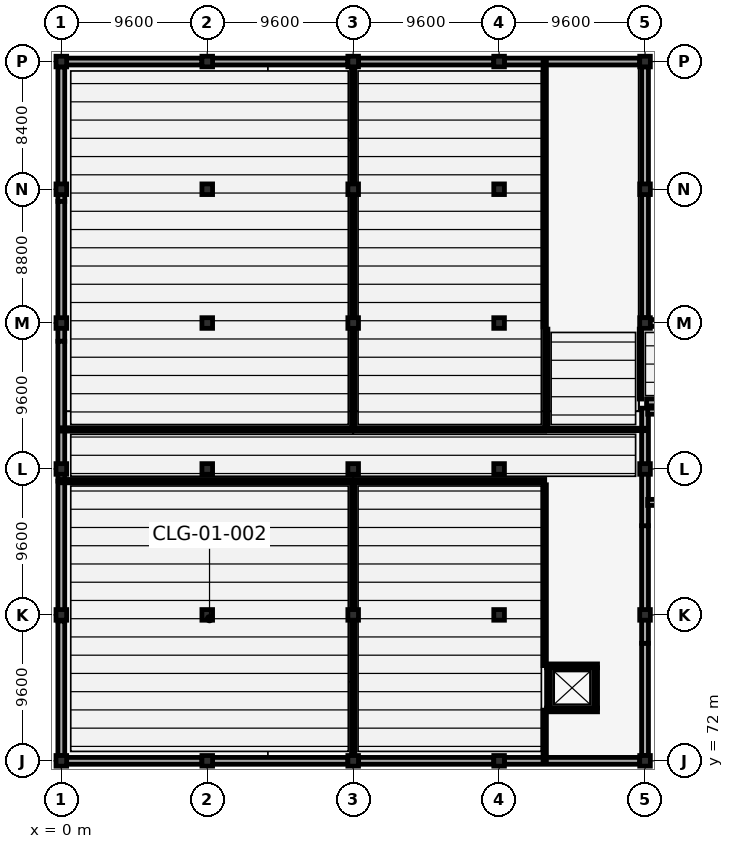
"""IFC4 building model, lengths in metres.
Left out: names, types, materials, properties, quantities, classifications, styles, units other than length and angle.
Written with IfcOpenShell. Run it as: python <this file> out.ifc"""

import sys

from ifc_helpers import new_model, si_unit, direction, frame, frame_2d, origin, origin_2d, place, context, subcontext, project, spatial, rectangle, extrude, element, fill, save


model = new_model("IFC4")
c1 = context("Model", 3, precision=1e-05, world=origin(), true_north=direction((0.0, 1.0)))
c2 = subcontext(c1, "Body", "Model", "MODEL_VIEW")
j1 = project(units=[si_unit("LENGTHUNIT", "METRE"), si_unit("PLANEANGLEUNIT", "RADIAN")], contexts=[c1])
p1 = place(None, origin())
s1 = spatial("IfcSite", under=j1, at=p1, CompositionType="ELEMENT")
p2 = place(p1, origin())
s2 = spatial("IfcBuilding", under=s1, at=p2, CompositionType="ELEMENT")
p3 = place(p2, frame((0.0, 0.0, -4.2)))
s3 = spatial("IfcBuildingStorey", under=s2, at=p3, CompositionType="ELEMENT", Elevation=-4.2)
for number, where, z_axis, x_axis in (
    (1, (0.0, 72.0, 0.0), (0.0, 0.0, 1.0), (1.0, 0.0, 0.0)),
    (2, (0.0, 81.6, 0.0), (0.0, 0.0, 1.0), (1.0, 0.0, 0.0)),
    (3, (0.0, 91.2, 0.0), (0.0, 0.0, 1.0), (1.0, 0.0, 0.0)),
    (4, (0.0, 100.8, 0.0), (0.0, 0.0, 1.0), (1.0, 0.0, 0.0)),
    (5, (0.0, 109.6, 0.0), (0.0, 0.0, 1.0), (1.0, 0.0, 0.0)),
    (6, (0.0, 118.0, 0.0), (0.0, 0.0, 1.0), (1.0, 0.0, 0.0)),
    (7, (9.6, 72.0, 0.0), (0.0, 0.0, 1.0), (1.0, 0.0, 0.0)),
    (8, (9.6, 81.6, 0.0), (0.0, 0.0, 1.0), (1.0, 0.0, 0.0)),
    (9, (9.6, 91.2, 0.0), (0.0, 0.0, 1.0), (1.0, 0.0, 0.0)),
    (10, (9.6, 100.8, 0.0), (0.0, 0.0, 1.0), (1.0, 0.0, 0.0)),
    (11, (9.6, 109.6, 0.0), (0.0, 0.0, 1.0), (1.0, 0.0, 0.0)),
    (12, (9.6, 118.0, 0.0), (0.0, 0.0, 1.0), (1.0, 0.0, 0.0)),
    (13, (19.2, 72.0, 0.0), (0.0, 0.0, 1.0), (1.0, 0.0, 0.0)),
    (14, (19.2, 81.6, 0.0), (0.0, 0.0, 1.0), (1.0, 0.0, 0.0)),
    (15, (19.2, 91.2, 0.0), (0.0, 0.0, 1.0), (1.0, 0.0, 0.0)),
    (16, (19.2, 100.8, 0.0), (0.0, 0.0, 1.0), (1.0, 0.0, 0.0)),
    (17, (19.2, 109.6, 0.0), (0.0, 0.0, 1.0), (1.0, 0.0, 0.0)),
    (18, (19.2, 118.0, 0.0), (0.0, 0.0, 1.0), (1.0, 0.0, 0.0)),
    (19, (28.8, 72.0, 0.0), (0.0, 0.0, 1.0), (1.0, 0.0, 0.0)),
    (20, (28.8, 81.6, 0.0), (0.0, 0.0, 1.0), (1.0, 0.0, 0.0)),
    (21, (28.8, 91.2, 0.0), (0.0, 0.0, 1.0), (1.0, 0.0, 0.0)),
    (22, (28.8, 100.8, 0.0), (0.0, 0.0, 1.0), (1.0, 0.0, 0.0)),
    (23, (28.8, 109.6, 0.0), (0.0, 0.0, 1.0), (1.0, 0.0, 0.0)),
    (24, (28.8, 118.0, 0.0), (0.0, 0.0, 1.0), (1.0, 0.0, 0.0)),
    (25, (38.4, 72.0, 0.0), (0.0, 0.0, 1.0), (1.0, 0.0, 0.0)),
    (26, (38.4, 81.6, 0.0), (0.0, 0.0, 1.0), (1.0, 0.0, 0.0)),
    (27, (38.4, 91.2, 0.0), (0.0, 0.0, 1.0), (1.0, 0.0, 0.0)),
    (28, (38.4, 100.8, 0.0), (0.0, 0.0, 1.0), (1.0, 0.0, 0.0)),
    (29, (38.4, 109.6, 0.0), (0.0, 0.0, 1.0), (1.0, 0.0, 0.0)),
    (30, (38.4, 118.0, 0.0), (0.0, 0.0, 1.0), (1.0, 0.0, 0.0)),
):
    element("IfcColumn", number, at=place(p3, frame(where, z_axis=z_axis, x_axis=x_axis)), inside=s3, PredefinedType="COLUMN", context=c2, shape_type="SweptSolid", body=[
        extrude(rectangle(XDim=0.7, YDim=0.7, at=origin_2d()), origin(), (0.0, 0.0, 1.0), 4.2),
    ])
p4 = place(p3, frame((0.35, 72.0, 0.0), z_axis=(0.0, 0.0, 1.0), x_axis=(1.0, 0.0, 0.0)))
e31 = element("IfcWall", 31, at=p4, inside=s3, PredefinedType="SOLIDWALL", context=c2, shape_type="SweptSolid", body=[
    extrude(rectangle(XDim=8.9, YDim=0.45, at=frame_2d((4.45, 0.0))), origin(), (0.0, 0.0, 1.0), 3.84),
])
p5 = place(p3, frame((9.95, 72.0, 0.0), z_axis=(0.0, 0.0, 1.0), x_axis=(1.0, 0.0, 0.0)))
e32 = element("IfcWall", 32, at=p5, inside=s3, PredefinedType="SOLIDWALL", context=c2, shape_type="SweptSolid", body=[
    extrude(rectangle(XDim=8.9, YDim=0.45, at=frame_2d((4.45, 0.0))), origin(), (0.0, 0.0, 1.0), 3.84),
])
p6 = place(p3, frame((19.55, 72.0, 0.0), z_axis=(0.0, 0.0, 1.0), x_axis=(1.0, 0.0, 0.0)))
e33 = element("IfcWall", 33, at=p6, inside=s3, PredefinedType="SOLIDWALL", context=c2, shape_type="SweptSolid", body=[
    extrude(rectangle(XDim=8.9, YDim=0.45, at=frame_2d((4.45, 0.0))), origin(), (0.0, 0.0, 1.0), 3.84),
])
p7 = place(p3, frame((29.15, 72.0, 0.0), z_axis=(0.0, 0.0, 1.0), x_axis=(1.0, 0.0, 0.0)))
e34 = element("IfcWall", 34, at=p7, inside=s3, PredefinedType="SOLIDWALL", context=c2, shape_type="SweptSolid", body=[
    extrude(rectangle(XDim=8.9, YDim=0.45, at=frame_2d((4.45, 0.0))), origin(), (0.0, 0.0, 1.0), 3.84),
])
p8 = place(p3, frame((38.4, 72.35, 0.0), z_axis=(0.0, 0.0, 1.0), x_axis=(0.0, 1.0, 0.0)))
e35 = element("IfcWall", 35, at=p8, inside=s3, PredefinedType="SOLIDWALL", context=c2, shape_type="SweptSolid", body=[
    extrude(rectangle(XDim=7.383, YDim=0.45, at=frame_2d((3.691, 0.0))), origin(), (0.0, 0.0, 1.0), 3.84),
])
p9 = place(p3, frame((38.4, 79.733, 0.0), z_axis=(0.0, 0.0, 1.0), x_axis=(0.0, 1.0, 0.0)))
e36 = element("IfcWall", 36, at=p9, inside=s3, PredefinedType="SOLIDWALL", context=c2, shape_type="SweptSolid", body=[
    extrude(rectangle(XDim=7.734, YDim=0.45, at=frame_2d((3.867, 0.0))), origin(), (0.0, 0.0, 1.0), 3.84),
])
p10 = place(p3, frame((38.4, 87.467, 0.0), z_axis=(0.0, 0.0, 1.0), x_axis=(0.0, 1.0, 0.0)))
e37 = element("IfcWall", 37, at=p10, inside=s3, PredefinedType="SOLIDWALL", context=c2, shape_type="SweptSolid", body=[
    extrude(rectangle(XDim=7.733, YDim=0.45, at=frame_2d((3.866, 0.0))), origin(), (0.0, 0.0, 1.0), 3.84),
])
for number, where, z_axis, x_axis in (
    (38, (38.4, 101.15, 0.0), (0.0, 0.0, 1.0), (0.0, 1.0, 0.0)),
    (39, (38.4, 109.4, 0.0), (0.0, 0.0, 1.0), (0.0, 1.0, 0.0)),
):
    element("IfcWall", number, at=place(p3, frame(where, z_axis=z_axis, x_axis=x_axis)), inside=s3, PredefinedType="SOLIDWALL", context=c2, shape_type="SweptSolid", body=[
        extrude(rectangle(XDim=8.25, YDim=0.45, at=frame_2d((4.125, 0.0))), origin(), (0.0, 0.0, 1.0), 3.84),
    ])
p11 = place(p3, frame((38.05, 118.0, 0.0), z_axis=(0.0, 0.0, 1.0), x_axis=(-1.0, 0.0, 0.0)))
e40 = element("IfcWall", 40, at=p11, inside=s3, PredefinedType="SOLIDWALL", context=c2, shape_type="SweptSolid", body=[
    extrude(rectangle(XDim=8.9, YDim=0.45, at=frame_2d((4.45, 0.0))), origin(), (0.0, 0.0, 1.0), 3.84),
])
p12 = place(p3, frame((28.45, 118.0, 0.0), z_axis=(0.0, 0.0, 1.0), x_axis=(-1.0, 0.0, 0.0)))
e41 = element("IfcWall", 41, at=p12, inside=s3, PredefinedType="SOLIDWALL", context=c2, shape_type="SweptSolid", body=[
    extrude(rectangle(XDim=8.9, YDim=0.45, at=frame_2d((4.45, 0.0))), origin(), (0.0, 0.0, 1.0), 3.84),
])
p13 = place(p3, frame((18.85, 118.0, 0.0), z_axis=(0.0, 0.0, 1.0), x_axis=(-1.0, 0.0, 0.0)))
e42 = element("IfcWall", 42, at=p13, inside=s3, PredefinedType="SOLIDWALL", context=c2, shape_type="SweptSolid", body=[
    extrude(rectangle(XDim=8.9, YDim=0.45, at=frame_2d((4.45, 0.0))), origin(), (0.0, 0.0, 1.0), 3.84),
])
p14 = place(p3, frame((9.25, 118.0, 0.0), z_axis=(0.0, 0.0, 1.0), x_axis=(-1.0, 0.0, 0.0)))
e43 = element("IfcWall", 43, at=p14, inside=s3, PredefinedType="SOLIDWALL", context=c2, shape_type="SweptSolid", body=[
    extrude(rectangle(XDim=8.9, YDim=0.45, at=frame_2d((4.45, 0.0))), origin(), (0.0, 0.0, 1.0), 3.84),
])
p15 = place(p3, frame((0.0, 117.65, 0.0), z_axis=(0.0, 0.0, 1.0), x_axis=(0.0, -1.0, 0.0)))
e44 = element("IfcWall", 44, at=p15, inside=s3, PredefinedType="SOLIDWALL", context=c2, shape_type="SweptSolid", body=[
    extrude(rectangle(XDim=8.85, YDim=0.45, at=frame_2d((4.425, 0.0))), origin(), (0.0, 0.0, 1.0), 3.84),
])
p16 = place(p3, frame((0.0, 108.8, 0.0), z_axis=(0.0, 0.0, 1.0), x_axis=(0.0, -1.0, 0.0)))
e45 = element("IfcWall", 45, at=p16, inside=s3, PredefinedType="SOLIDWALL", context=c2, shape_type="SweptSolid", body=[
    extrude(rectangle(XDim=9.2, YDim=0.45, at=frame_2d((4.6, 0.0))), origin(), (0.0, 0.0, 1.0), 3.84),
])
p17 = place(p3, frame((0.0, 99.6, 0.0), z_axis=(0.0, 0.0, 1.0), x_axis=(0.0, -1.0, 0.0)))
e46 = element("IfcWall", 46, at=p17, inside=s3, PredefinedType="SOLIDWALL", context=c2, shape_type="SweptSolid", body=[
    extrude(rectangle(XDim=9.2, YDim=0.45, at=frame_2d((4.6, 0.0))), origin(), (0.0, 0.0, 1.0), 3.84),
])
p18 = place(p3, frame((0.0, 90.4, 0.0), z_axis=(0.0, 0.0, 1.0), x_axis=(0.0, -1.0, 0.0)))
e47 = element("IfcWall", 47, at=p18, inside=s3, PredefinedType="SOLIDWALL", context=c2, shape_type="SweptSolid", body=[
    extrude(rectangle(XDim=9.2, YDim=0.45, at=frame_2d((4.6, 0.0))), origin(), (0.0, 0.0, 1.0), 3.84),
])
p19 = place(p3, frame((0.0, 81.2, 0.0), z_axis=(0.0, 0.0, 1.0), x_axis=(0.0, -1.0, 0.0)))
e48 = element("IfcWall", 48, at=p19, inside=s3, PredefinedType="SOLIDWALL", context=c2, shape_type="SweptSolid", body=[
    extrude(rectangle(XDim=8.85, YDim=0.45, at=frame_2d((4.425, 0.0))), origin(), (0.0, 0.0, 1.0), 3.84),
])
for number, where, z_axis, x_axis in (
    (49, (38.5, 95.58, 0.0), (0.0, 0.0, 1.0), (1.0, 0.0, 0.0)),
    (50, (38.5, 100.8, 0.0), (0.0, 0.0, 1.0), (1.0, 0.0, 0.0)),
):
    element("IfcWall", number, at=place(p3, frame(where, z_axis=z_axis, x_axis=x_axis)), inside=s3, PredefinedType="SOLIDWALL", context=c2, shape_type="SweptSolid", body=[
        extrude(rectangle(XDim=9.4, YDim=0.45, at=frame_2d((4.7, 0.0))), origin(), (0.0, 0.0, 1.0), 3.84),
    ])
for number, where, z_axis, x_axis in (
    (51, (38.575, 89.0, 0.0), (0.0, 0.0, 1.0), (1.0, 0.0, 0.0)),
    (52, (38.575, 95.0, 0.0), (0.0, 0.0, 1.0), (1.0, 0.0, 0.0)),
):
    element("IfcWall", number, at=place(p3, frame(where, z_axis=z_axis, x_axis=x_axis)), inside=s3, PredefinedType="SOLIDWALL", context=c2, shape_type="SweptSolid", body=[
        extrude(rectangle(XDim=9.25, YDim=0.4, at=frame_2d((4.625, 0.0))), origin(), (0.0, 0.0, 1.0), 9.0),
    ])
for number, where, z_axis, x_axis in (
    (53, (35.275, 75.35, -1.5), (0.0, 0.0, 1.0), (-1.0, 0.0, 0.0)),
    (54, (31.925, 78.25, -1.5), (0.0, 0.0, 1.0), (1.0, 0.0, 0.0)),
):
    element("IfcWall", number, at=place(p3, frame(where, z_axis=z_axis, x_axis=x_axis)), inside=s3, PredefinedType="SOLIDWALL", context=c2, shape_type="SweptSolid", body=[
        extrude(rectangle(XDim=3.35, YDim=0.25, at=frame_2d((1.675, 0.0))), origin(), (0.0, 0.0, 1.0), 5.45),
    ])
p20 = place(p3, frame((32.05, 75.475, -1.5), z_axis=(0.0, 0.0, 1.0), x_axis=(0.0, 1.0, 0.0)))
e55 = element("IfcWall", 55, at=p20, inside=s3, PredefinedType="SOLIDWALL", context=c2, shape_type="SweptSolid", body=[
    extrude(rectangle(XDim=2.65, YDim=0.25, at=frame_2d((1.325, 0.0))), origin(), (0.0, 0.0, 1.0), 5.45),
])
p21 = place(p20, frame((0.425, 0.0, 1.5)))
e56 = element("IfcOpeningElement", 56, at=p21, cuts=e55, PredefinedType="OPENING", context=c2, shape_type="SweptSolid", body=[
    extrude(rectangle(XDim=1.8, YDim=2.3, at=frame_2d((0.9, 1.15))), frame((0.0, 0.135, 0.0), z_axis=(0.0, -1.0, 0.0), x_axis=(1.0, 0.0, 0.0)), (0.0, 0.0, 1.0), 0.27),
])
p22 = place(p3, frame((35.15, 78.125, -1.5), z_axis=(0.0, 0.0, 1.0), x_axis=(0.0, -1.0, 0.0)))
e57 = element("IfcWall", 57, at=p22, inside=s3, PredefinedType="SOLIDWALL", context=c2, shape_type="SweptSolid", body=[
    extrude(rectangle(XDim=2.65, YDim=0.25, at=frame_2d((1.325, 0.0))), origin(), (0.0, 0.0, 1.0), 5.45),
])
p23 = place(p3, frame((19.2, 72.05, 0.0), z_axis=(0.0, 0.0, 1.0), x_axis=(0.0, 1.0, 0.0)))
e58 = element("IfcWall", 58, at=p23, inside=s3, PredefinedType="PARTITIONING", context=c2, shape_type="SweptSolid", body=[
    extrude(rectangle(XDim=18.25, YDim=0.22, at=frame_2d((9.125, 0.0))), origin(), (0.0, 0.0, 1.0), 2.952),
])
p24 = place(p3, frame((0.05, 90.4, 0.0), z_axis=(0.0, 0.0, 1.0), x_axis=(1.0, 0.0, 0.0)))
e59 = element("IfcWall", 59, at=p24, inside=s3, PredefinedType="PARTITIONING", context=c2, shape_type="SweptSolid", body=[
    extrude(rectangle(XDim=19.05, YDim=0.22, at=frame_2d((9.525, 0.0))), origin(), (0.0, 0.0, 1.0), 3.84),
])
p25 = place(p24, frame((6.251, 0.0, 0.0)))
e60 = element("IfcOpeningElement", 60, at=p25, cuts=e59, PredefinedType="OPENING", context=c2, shape_type="SweptSolid", body=[
    extrude(rectangle(XDim=1.5, YDim=2.2, at=frame_2d((0.75, 1.1))), frame((0.0, 0.12, 0.0), z_axis=(0.0, -1.0, 0.0), x_axis=(1.0, 0.0, 0.0)), (0.0, 0.0, 1.0), 0.24),
])
p26 = place(p3, frame((19.3, 90.4, 0.0), z_axis=(0.0, 0.0, 1.0), x_axis=(1.0, 0.0, 0.0)))
e61 = element("IfcWall", 61, at=p26, inside=s3, PredefinedType="PARTITIONING", context=c2, shape_type="SweptSolid", body=[
    extrude(rectangle(XDim=12.5, YDim=0.22, at=frame_2d((6.25, 0.0))), origin(), (0.0, 0.0, 1.0), 3.84),
])
p27 = place(p26, frame((5.5, 0.0, 0.0)))
e62 = element("IfcOpeningElement", 62, at=p27, cuts=e61, PredefinedType="OPENING", context=c2, shape_type="SweptSolid", body=[
    extrude(rectangle(XDim=1.5, YDim=2.2, at=frame_2d((0.75, 1.1))), frame((0.0, 0.12, 0.0), z_axis=(0.0, -1.0, 0.0), x_axis=(1.0, 0.0, 0.0)), (0.0, 0.0, 1.0), 0.24),
])
p28 = place(p3, frame((19.2, 93.9, 0.0), z_axis=(0.0, 0.0, 1.0), x_axis=(0.0, 1.0, 0.0)))
e63 = element("IfcWall", 63, at=p28, inside=s3, PredefinedType="PARTITIONING", context=c2, shape_type="SweptSolid", body=[
    extrude(rectangle(XDim=24.05, YDim=0.22, at=frame_2d((12.025, 0.0))), origin(), (0.0, 0.0, 1.0), 2.952),
])
p29 = place(p3, frame((0.05, 93.8, 0.0), z_axis=(0.0, 0.0, 1.0), x_axis=(1.0, 0.0, 0.0)))
e64 = element("IfcWall", 64, at=p29, inside=s3, PredefinedType="PARTITIONING", context=c2, shape_type="SweptSolid", body=[
    extrude(rectangle(XDim=19.05, YDim=0.22, at=frame_2d((9.525, 0.0))), origin(), (0.0, 0.0, 1.0), 3.84),
])
p30 = place(p29, frame((8.775, 0.0, 0.0)))
e65 = element("IfcOpeningElement", 65, at=p30, cuts=e64, PredefinedType="OPENING", context=c2, shape_type="SweptSolid", body=[
    extrude(rectangle(XDim=1.5, YDim=2.2, at=frame_2d((0.75, 1.1))), frame((0.0, 0.12, 0.0), z_axis=(0.0, -1.0, 0.0), x_axis=(1.0, 0.0, 0.0)), (0.0, 0.0, 1.0), 0.24),
])
p31 = place(p3, frame((19.3, 93.8, 0.0), z_axis=(0.0, 0.0, 1.0), x_axis=(1.0, 0.0, 0.0)))
e66 = element("IfcWall", 66, at=p31, inside=s3, PredefinedType="PARTITIONING", context=c2, shape_type="SweptSolid", body=[
    extrude(rectangle(XDim=12.5, YDim=0.22, at=frame_2d((6.25, 0.0))), origin(), (0.0, 0.0, 1.0), 3.84),
])
p32 = place(p31, frame((5.5, 0.0, 0.0)))
e67 = element("IfcOpeningElement", 67, at=p32, cuts=e66, PredefinedType="OPENING", context=c2, shape_type="SweptSolid", body=[
    extrude(rectangle(XDim=1.5, YDim=2.2, at=frame_2d((0.75, 1.1))), frame((0.0, 0.12, 0.0), z_axis=(0.0, -1.0, 0.0), x_axis=(1.0, 0.0, 0.0)), (0.0, 0.0, 1.0), 0.24),
])
p33 = place(p3, frame((31.9, 93.9, 0.0), z_axis=(0.0, 0.0, 1.0), x_axis=(0.0, 1.0, 0.0)))
e68 = element("IfcWall", 68, at=p33, inside=s3, PredefinedType="PARTITIONING", context=c2, shape_type="SweptSolid", body=[
    extrude(rectangle(XDim=6.5, YDim=0.22, at=frame_2d((3.25, 0.0))), origin(), (0.0, 0.0, 1.0), 3.84),
])
p34 = place(p33, frame((2.5, 0.0, 0.0)))
e69 = element("IfcOpeningElement", 69, at=p34, cuts=e68, PredefinedType="OPENING", context=c2, shape_type="SweptSolid", body=[
    extrude(rectangle(XDim=1.5, YDim=2.2, at=frame_2d((0.75, 1.1))), frame((0.0, 0.12, 0.0), z_axis=(0.0, -1.0, 0.0), x_axis=(1.0, 0.0, 0.0)), (0.0, 0.0, 1.0), 0.24),
])
p35 = place(p3, frame((32.0, 93.8, 0.0), z_axis=(0.0, 0.0, 1.0), x_axis=(1.0, 0.0, 0.0)))
e70 = element("IfcWall", 70, at=p35, inside=s3, PredefinedType="PARTITIONING", context=c2, shape_type="SweptSolid", body=[
    extrude(rectangle(XDim=6.35, YDim=0.16, at=frame_2d((3.175, 0.0))), origin(), (0.0, 0.0, 1.0), 3.84),
])
p36 = place(p35, frame((2.275, 0.0, 0.0)))
e71 = element("IfcOpeningElement", 71, at=p36, cuts=e70, PredefinedType="OPENING", context=c2, shape_type="SweptSolid", body=[
    extrude(rectangle(XDim=1.8, YDim=2.15, at=frame_2d((0.9, 1.075))), frame((0.0, 0.09, 0.0), z_axis=(0.0, -1.0, 0.0), x_axis=(1.0, 0.0, 0.0)), (0.0, 0.0, 1.0), 0.18),
])
p37 = place(p3, frame((38.1, 95.8, 0.0), z_axis=(0.0, 0.0, 1.0), x_axis=(0.0, 1.0, 0.0)))
e72 = element("IfcWall", 72, at=p37, inside=s3, PredefinedType="PARTITIONING", context=c2, shape_type="SweptSolid", body=[
    extrude(rectangle(XDim=4.6, YDim=0.16, at=frame_2d((2.3, 0.0))), origin(), (0.0, 0.0, 1.0), 3.84),
])
p38 = place(p37, frame((1.4, 0.0, 0.0)))
e73 = element("IfcOpeningElement", 73, at=p38, cuts=e72, PredefinedType="OPENING", context=c2, shape_type="SweptSolid", body=[
    extrude(rectangle(XDim=1.8, YDim=2.15, at=frame_2d((0.9, 1.075))), frame((0.0, 0.09, 0.0), z_axis=(0.0, -1.0, 0.0), x_axis=(1.0, 0.0, 0.0)), (0.0, 0.0, 1.0), 0.18),
])
p39 = place(p3, frame((31.8, 72.05, 0.0), z_axis=(0.0, 0.0, 1.0), x_axis=(0.0, 1.0, 0.0)))
e74 = element("IfcWall", 74, at=p39, inside=s3, PredefinedType="PARTITIONING", context=c2, shape_type="SweptSolid", body=[
    extrude(rectangle(XDim=3.285, YDim=0.22, at=frame_2d((1.643, 0.0))), origin(), (0.0, 0.0, 1.0), 3.84),
])
p40 = place(p3, frame((31.8, 78.265, 0.0), z_axis=(0.0, 0.0, 1.0), x_axis=(0.0, 1.0, 0.0)))
e75 = element("IfcWall", 75, at=p40, inside=s3, PredefinedType="PARTITIONING", context=c2, shape_type="SweptSolid", body=[
    extrude(rectangle(XDim=11.895, YDim=0.22, at=frame_2d((5.948, 0.0))), origin(), (0.0, 0.0, 1.0), 3.84),
])
p41 = place(p3, frame((31.8, 100.54, 0.0), z_axis=(0.0, 0.0, 1.0), x_axis=(0.0, 1.0, 0.0)))
e76 = element("IfcWall", 76, at=p41, inside=s3, PredefinedType="PARTITIONING", context=c2, shape_type="SweptSolid", body=[
    extrude(rectangle(XDim=17.41, YDim=0.22, at=frame_2d((8.705, 0.0))), origin(), (0.0, 0.0, 1.0), 3.84),
])
p42 = place(p21, origin())
e77 = element("IfcDoor", 77, at=p42, inside=s3, OperationType="DOUBLE_DOOR_SLIDING", PredefinedType="DOOR", context=c2, shape_type="SweptSolid", body=[
    extrude(rectangle(XDim=1.8, YDim=2.3, at=frame_2d((0.9, 1.15))), frame((0.0, 0.025, 0.0), z_axis=(0.0, -1.0, 0.0), x_axis=(1.0, 0.0, 0.0)), (0.0, 0.0, 1.0), 0.05),
])
fill(e56, e77)
p43 = place(p25, origin())
e78 = element("IfcDoor", 78, at=p43, inside=s3, OperationType="SLIDING_TO_RIGHT", PredefinedType="DOOR", context=c2, shape_type="SweptSolid", body=[
    extrude(rectangle(XDim=1.5, YDim=2.2, at=frame_2d((0.75, 1.1))), frame((0.0, 0.025, 0.0), z_axis=(0.0, -1.0, 0.0), x_axis=(1.0, 0.0, 0.0)), (0.0, 0.0, 1.0), 0.05),
])
fill(e60, e78)
p44 = place(p27, origin())
e79 = element("IfcDoor", 79, at=p44, inside=s3, OperationType="SLIDING_TO_RIGHT", PredefinedType="DOOR", context=c2, shape_type="SweptSolid", body=[
    extrude(rectangle(XDim=1.5, YDim=2.2, at=frame_2d((0.75, 1.1))), frame((0.0, 0.025, 0.0), z_axis=(0.0, -1.0, 0.0), x_axis=(1.0, 0.0, 0.0)), (0.0, 0.0, 1.0), 0.05),
])
fill(e62, e79)
p45 = place(p30, origin())
e80 = element("IfcDoor", 80, at=p45, inside=s3, OperationType="SLIDING_TO_RIGHT", PredefinedType="DOOR", context=c2, shape_type="SweptSolid", body=[
    extrude(rectangle(XDim=1.5, YDim=2.2, at=frame_2d((0.75, 1.1))), frame((0.0, 0.025, 0.0), z_axis=(0.0, -1.0, 0.0), x_axis=(1.0, 0.0, 0.0)), (0.0, 0.0, 1.0), 0.05),
])
fill(e65, e80)
p46 = place(p32, origin())
e81 = element("IfcDoor", 81, at=p46, inside=s3, OperationType="SLIDING_TO_RIGHT", PredefinedType="DOOR", context=c2, shape_type="SweptSolid", body=[
    extrude(rectangle(XDim=1.5, YDim=2.2, at=frame_2d((0.75, 1.1))), frame((0.0, 0.025, 0.0), z_axis=(0.0, -1.0, 0.0), x_axis=(1.0, 0.0, 0.0)), (0.0, 0.0, 1.0), 0.05),
])
fill(e67, e81)
p47 = place(p34, origin())
e82 = element("IfcDoor", 82, at=p47, inside=s3, OperationType="SLIDING_TO_RIGHT", PredefinedType="DOOR", context=c2, shape_type="SweptSolid", body=[
    extrude(rectangle(XDim=1.5, YDim=2.2, at=frame_2d((0.75, 1.1))), frame((0.0, 0.025, 0.0), z_axis=(0.0, -1.0, 0.0), x_axis=(1.0, 0.0, 0.0)), (0.0, 0.0, 1.0), 0.05),
])
fill(e69, e82)
p48 = place(p36, origin())
e83 = element("IfcDoor", 83, at=p48, inside=s3, OperationType="DOUBLE_DOOR_SINGLE_SWING", PredefinedType="DOOR", context=c2, shape_type="SweptSolid", body=[
    extrude(rectangle(XDim=1.8, YDim=2.15, at=frame_2d((0.9, 1.075))), frame((0.0, 0.025, 0.0), z_axis=(0.0, -1.0, 0.0), x_axis=(1.0, 0.0, 0.0)), (0.0, 0.0, 1.0), 0.05),
])
fill(e71, e83)
p49 = place(p38, origin())
e84 = element("IfcDoor", 84, at=p49, inside=s3, OperationType="DOUBLE_DOOR_SINGLE_SWING", PredefinedType="DOOR", context=c2, shape_type="SweptSolid", body=[
    extrude(rectangle(XDim=1.8, YDim=2.15, at=frame_2d((0.9, 1.075))), frame((0.0, 0.025, 0.0), z_axis=(0.0, -1.0, 0.0), x_axis=(1.0, 0.0, 0.0)), (0.0, 0.0, 1.0), 0.05),
])
fill(e73, e84)
save(model, sys.argv[1])
